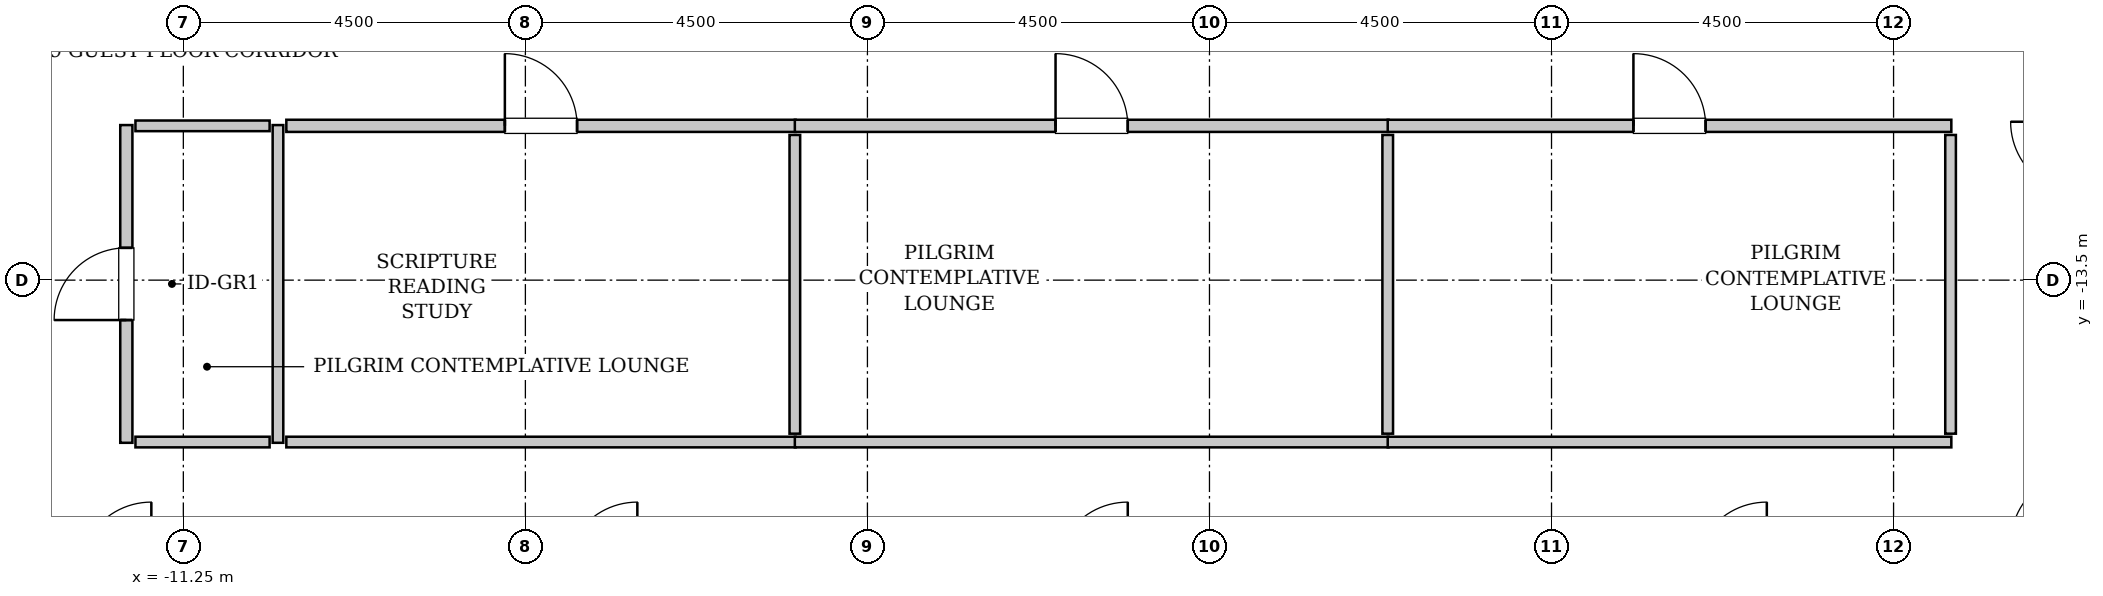
"""IFC4 building model, lengths in metres.
Left out: names, types, materials, properties, quantities, classifications, styles, units other than length and angle.
Written with IfcOpenShell. Run it as: python <this file> out.ifc"""

import sys

from ifc_helpers import new_model, si_unit, direction, frame, frame_2d, origin, place, context, subcontext, project, spatial, rectangle, extrude, source, transform, mapped, element, fill, save


model = new_model("IFC4")
c1 = context("Model", 3, precision=1e-05, world=origin(), true_north=direction((0.0, 1.0)))
c2 = subcontext(c1, "Body", "Model", "MODEL_VIEW")
j1 = project(units=[si_unit("LENGTHUNIT", "METRE"), si_unit("PLANEANGLEUNIT", "RADIAN")], contexts=[c1])
p1 = place(None, origin())
s1 = spatial("IfcSite", under=j1, at=p1, CompositionType="ELEMENT")
p2 = place(p1, origin())
s2 = spatial("IfcBuilding", under=s1, at=p2, CompositionType="ELEMENT")
p3 = place(p2, frame((0.0, 0.0, 198.2)))
s3 = spatial("IfcBuildingStorey", under=s2, at=p3, CompositionType="ELEMENT", Elevation=198.2)
m1 = source(origin(), c2, "Body", "SweptSolid", [
    extrude(rectangle(XDim=4.18, YDim=0.16, at=frame_2d((2.09, 0.0))), origin(), (0.0, 0.0, 1.0), 3.485),
])
p4 = place(p3, frame((-12.0, -15.64, 0.0), z_axis=(0.0, 0.0, 1.0), x_axis=(0.0, 1.0, 0.0)))
e1 = element("IfcWall", 1, at=p4, inside=s3, PredefinedType="PARTITIONING", context=c2, shape_type="MappedRepresentation", body=[
    mapped(m1, transform((0.0, 0.0, 0.0), x_axis=(1.0, 0.0, 0.0), y_axis=(0.0, 1.0, 0.0), z_axis=(0.0, 0.0, 1.0), scale=1.0)),
])
p5 = place(p4, frame((1.615, 0.0, 0.0)))
e2 = element("IfcOpeningElement", 2, at=p5, cuts=e1, PredefinedType="OPENING", context=c2, shape_type="SweptSolid", body=[
    extrude(rectangle(XDim=0.95, YDim=2.1, at=frame_2d((0.475, 1.05))), frame((0.0, 0.09, 0.0), z_axis=(0.0, -1.0, 0.0), x_axis=(1.0, 0.0, 0.0)), (0.0, 0.0, 1.0), 0.18),
])
m2 = source(origin(), c2, "Body", "SweptSolid", [
    extrude(rectangle(XDim=4.18, YDim=0.14, at=frame_2d((2.09, 0.0))), origin(), (0.0, 0.0, 1.0), 3.485),
])
p6 = place(p3, frame((-10.005, -15.64, 0.0), z_axis=(0.0, 0.0, 1.0), x_axis=(0.0, 1.0, 0.0)))
e3 = element("IfcWall", 3, at=p6, inside=s3, PredefinedType="PARTITIONING", context=c2, shape_type="MappedRepresentation", body=[
    mapped(m2, transform((0.0, 0.0, 0.0), x_axis=(1.0, 0.0, 0.0), y_axis=(0.0, 1.0, 0.0), z_axis=(0.0, 0.0, 1.0), scale=1.0)),
])
m3 = source(origin(), c2, "Body", "SweptSolid", [
    extrude(rectangle(XDim=1.765, YDim=0.14, at=frame_2d((0.882, 0.0))), origin(), (0.0, 0.0, 1.0), 3.485),
])
for number, where, z_axis, x_axis in (
    (4, (-11.88, -11.47, 0.0), (0.0, 0.0, 1.0), (1.0, 0.0, 0.0)),
    (5, (-11.88, -15.63, 0.0), (0.0, 0.0, 1.0), (1.0, 0.0, 0.0)),
):
    element("IfcWall", number, at=place(p3, frame(where, z_axis=z_axis, x_axis=x_axis)), inside=s3, PredefinedType="PARTITIONING", context=c2, shape_type="MappedRepresentation", body=[
        mapped(m3, transform((0.0, 0.0, 0.0), x_axis=(1.0, 0.0, 0.0), y_axis=(0.0, 1.0, 0.0), z_axis=(0.0, 0.0, 1.0), scale=1.0)),
    ])
m4 = source(origin(), c2, "Body", "SweptSolid", [
    extrude(rectangle(XDim=6.7, YDim=0.16, at=frame_2d((3.35, 0.0))), origin(), (0.0, 0.0, 1.0), 3.485),
])
p7 = place(p3, frame((-9.895, -11.47, 0.0), z_axis=(0.0, 0.0, 1.0), x_axis=(1.0, 0.0, 0.0)))
e6 = element("IfcWall", 6, at=p7, inside=s3, PredefinedType="PARTITIONING", context=c2, shape_type="MappedRepresentation", body=[
    mapped(m4, transform((0.0, 0.0, 0.0), x_axis=(1.0, 0.0, 0.0), y_axis=(0.0, 1.0, 0.0), z_axis=(0.0, 0.0, 1.0), scale=1.0)),
])
p8 = place(p7, frame((2.875, 0.0, 0.0)))
e7 = element("IfcOpeningElement", 7, at=p8, cuts=e6, PredefinedType="OPENING", context=c2, shape_type="SweptSolid", body=[
    extrude(rectangle(XDim=0.95, YDim=2.1, at=frame_2d((0.475, 1.05))), frame((0.0, 0.09, 0.0), z_axis=(0.0, -1.0, 0.0), x_axis=(1.0, 0.0, 0.0)), (0.0, 0.0, 1.0), 0.18),
])
m5 = source(origin(), c2, "Body", "SweptSolid", [
    extrude(rectangle(XDim=6.7, YDim=0.14, at=frame_2d((3.35, 0.0))), origin(), (0.0, 0.0, 1.0), 3.485),
])
p9 = place(p3, frame((-9.895, -15.63, 0.0), z_axis=(0.0, 0.0, 1.0), x_axis=(1.0, 0.0, 0.0)))
e8 = element("IfcWall", 8, at=p9, inside=s3, PredefinedType="PARTITIONING", context=c2, shape_type="MappedRepresentation", body=[
    mapped(m5, transform((0.0, 0.0, 0.0), x_axis=(1.0, 0.0, 0.0), y_axis=(0.0, 1.0, 0.0), z_axis=(0.0, 0.0, 1.0), scale=1.0)),
])
m6 = source(origin(), c2, "Body", "SweptSolid", [
    extrude(rectangle(XDim=3.93, YDim=0.14, at=frame_2d((1.965, 0.0))), origin(), (0.0, 0.0, 1.0), 3.485),
])
p10 = place(p3, frame((-3.205, -15.52, 0.0), z_axis=(0.0, 0.0, 1.0), x_axis=(0.0, 1.0, 0.0)))
e9 = element("IfcWall", 9, at=p10, inside=s3, PredefinedType="PARTITIONING", context=c2, shape_type="MappedRepresentation", body=[
    mapped(m6, transform((0.0, 0.0, 0.0), x_axis=(1.0, 0.0, 0.0), y_axis=(0.0, 1.0, 0.0), z_axis=(0.0, 0.0, 1.0), scale=1.0)),
])
m7 = source(origin(), c2, "Body", "SweptSolid", [
    extrude(rectangle(XDim=7.81, YDim=0.16, at=frame_2d((3.905, 0.0))), origin(), (0.0, 0.0, 1.0), 3.485),
])
p11 = place(p3, frame((-3.205, -11.47, 0.0), z_axis=(0.0, 0.0, 1.0), x_axis=(1.0, 0.0, 0.0)))
e10 = element("IfcWall", 10, at=p11, inside=s3, PredefinedType="PARTITIONING", context=c2, shape_type="MappedRepresentation", body=[
    mapped(m7, transform((0.0, 0.0, 0.0), x_axis=(1.0, 0.0, 0.0), y_axis=(0.0, 1.0, 0.0), z_axis=(0.0, 0.0, 1.0), scale=1.0)),
])
p12 = place(p11, frame((3.43, 0.0, 0.0)))
e11 = element("IfcOpeningElement", 11, at=p12, cuts=e10, PredefinedType="OPENING", context=c2, shape_type="SweptSolid", body=[
    extrude(rectangle(XDim=0.95, YDim=2.1, at=frame_2d((0.475, 1.05))), frame((0.0, 0.09, 0.0), z_axis=(0.0, -1.0, 0.0), x_axis=(1.0, 0.0, 0.0)), (0.0, 0.0, 1.0), 0.18),
])
m8 = source(origin(), c2, "Body", "SweptSolid", [
    extrude(rectangle(XDim=7.81, YDim=0.14, at=frame_2d((3.905, 0.0))), origin(), (0.0, 0.0, 1.0), 3.485),
])
p13 = place(p3, frame((-3.205, -15.63, 0.0), z_axis=(0.0, 0.0, 1.0), x_axis=(1.0, 0.0, 0.0)))
e12 = element("IfcWall", 12, at=p13, inside=s3, PredefinedType="PARTITIONING", context=c2, shape_type="MappedRepresentation", body=[
    mapped(m8, transform((0.0, 0.0, 0.0), x_axis=(1.0, 0.0, 0.0), y_axis=(0.0, 1.0, 0.0), z_axis=(0.0, 0.0, 1.0), scale=1.0)),
])
p14 = place(p3, frame((4.595, -15.52, 0.0), z_axis=(0.0, 0.0, 1.0), x_axis=(0.0, 1.0, 0.0)))
e13 = element("IfcWall", 13, at=p14, inside=s3, PredefinedType="PARTITIONING", context=c2, shape_type="MappedRepresentation", body=[
    mapped(m6, transform((0.0, 0.0, 0.0), x_axis=(1.0, 0.0, 0.0), y_axis=(0.0, 1.0, 0.0), z_axis=(0.0, 0.0, 1.0), scale=1.0)),
])
m9 = source(origin(), c2, "Body", "SweptSolid", [
    extrude(rectangle(XDim=7.415, YDim=0.16, at=frame_2d((3.708, 0.0))), origin(), (0.0, 0.0, 1.0), 3.485),
])
p15 = place(p3, frame((4.595, -11.47, 0.0), z_axis=(0.0, 0.0, 1.0), x_axis=(1.0, 0.0, 0.0)))
e14 = element("IfcWall", 14, at=p15, inside=s3, PredefinedType="PARTITIONING", context=c2, shape_type="MappedRepresentation", body=[
    mapped(m9, transform((0.0, 0.0, 0.0), x_axis=(1.0, 0.0, 0.0), y_axis=(0.0, 1.0, 0.0), z_axis=(0.0, 0.0, 1.0), scale=1.0)),
])
p16 = place(p15, frame((3.232, 0.0, 0.0)))
e15 = element("IfcOpeningElement", 15, at=p16, cuts=e14, PredefinedType="OPENING", context=c2, shape_type="SweptSolid", body=[
    extrude(rectangle(XDim=0.95, YDim=2.1, at=frame_2d((0.475, 1.05))), frame((0.0, 0.09, 0.0), z_axis=(0.0, -1.0, 0.0), x_axis=(1.0, 0.0, 0.0)), (0.0, 0.0, 1.0), 0.18),
])
m10 = source(origin(), c2, "Body", "SweptSolid", [
    extrude(rectangle(XDim=7.415, YDim=0.14, at=frame_2d((3.708, 0.0))), origin(), (0.0, 0.0, 1.0), 3.485),
])
p17 = place(p3, frame((4.595, -15.63, 0.0), z_axis=(0.0, 0.0, 1.0), x_axis=(1.0, 0.0, 0.0)))
e16 = element("IfcWall", 16, at=p17, inside=s3, PredefinedType="PARTITIONING", context=c2, shape_type="MappedRepresentation", body=[
    mapped(m10, transform((0.0, 0.0, 0.0), x_axis=(1.0, 0.0, 0.0), y_axis=(0.0, 1.0, 0.0), z_axis=(0.0, 0.0, 1.0), scale=1.0)),
])
p18 = place(p3, frame((12.0, -15.52, 0.0), z_axis=(0.0, 0.0, 1.0), x_axis=(0.0, 1.0, 0.0)))
e17 = element("IfcWall", 17, at=p18, inside=s3, PredefinedType="PARTITIONING", context=c2, shape_type="MappedRepresentation", body=[
    mapped(m6, transform((0.0, 0.0, 0.0), x_axis=(1.0, 0.0, 0.0), y_axis=(0.0, 1.0, 0.0), z_axis=(0.0, 0.0, 1.0), scale=1.0)),
])
m11 = source(origin(), c2, "Body", "SweptSolid", [
    extrude(rectangle(XDim=0.95, YDim=2.1, at=frame_2d((0.475, 1.05))), frame((0.0, 0.025, 0.0), z_axis=(0.0, -1.0, 0.0), x_axis=(1.0, 0.0, 0.0)), (0.0, 0.0, 1.0), 0.05),
])
p19 = place(p5, origin())
e18 = element("IfcDoor", 18, at=p19, inside=s3, OperationType="SINGLE_SWING_LEFT", PredefinedType="DOOR", context=c2, shape_type="MappedRepresentation", body=[
    mapped(m11, transform((0.0, 0.0, 0.0), x_axis=(1.0, 0.0, 0.0), y_axis=(0.0, 1.0, 0.0), z_axis=(0.0, 0.0, 1.0), scale=1.0)),
])
fill(e2, e18)
p20 = place(p8, origin())
e19 = element("IfcDoor", 19, at=p20, inside=s3, OperationType="SINGLE_SWING_LEFT", PredefinedType="DOOR", context=c2, shape_type="MappedRepresentation", body=[
    mapped(m11, transform((0.0, 0.0, 0.0), x_axis=(1.0, 0.0, 0.0), y_axis=(0.0, 1.0, 0.0), z_axis=(0.0, 0.0, 1.0), scale=1.0)),
])
fill(e7, e19)
p21 = place(p12, origin())
e20 = element("IfcDoor", 20, at=p21, inside=s3, OperationType="SINGLE_SWING_LEFT", PredefinedType="DOOR", context=c2, shape_type="MappedRepresentation", body=[
    mapped(m11, transform((0.0, 0.0, 0.0), x_axis=(1.0, 0.0, 0.0), y_axis=(0.0, 1.0, 0.0), z_axis=(0.0, 0.0, 1.0), scale=1.0)),
])
fill(e11, e20)
p22 = place(p16, origin())
e21 = element("IfcDoor", 21, at=p22, inside=s3, OperationType="SINGLE_SWING_LEFT", PredefinedType="DOOR", context=c2, shape_type="MappedRepresentation", body=[
    mapped(m11, transform((0.0, 0.0, 0.0), x_axis=(1.0, 0.0, 0.0), y_axis=(0.0, 1.0, 0.0), z_axis=(0.0, 0.0, 1.0), scale=1.0)),
])
fill(e15, e21)
save(model, sys.argv[1])
